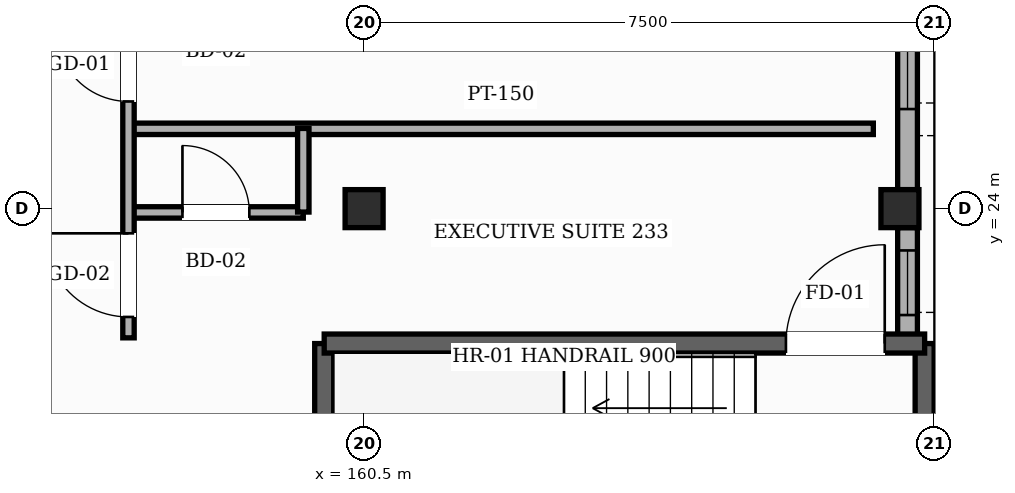
"""IFC4 building model, lengths in metres.
Left out: names, types, materials, properties, quantities, classifications, styles, units other than length and angle.
Written with IfcOpenShell. Run it as: python <this file> out.ifc"""

import sys

from ifc_helpers import new_model, si_unit, direction, frame, frame_2d, origin, origin_2d, place, context, subcontext, project, spatial, rectangle, hollow_rectangle, extrude, element, fill, save


model = new_model("IFC4")
c1 = context("Model", 3, precision=1e-05, world=origin(), true_north=direction((0.0, 1.0)))
c2 = subcontext(c1, "Body", "Model", "MODEL_VIEW")
j1 = project(units=[si_unit("LENGTHUNIT", "METRE"), si_unit("PLANEANGLEUNIT", "RADIAN")], contexts=[c1])
p1 = place(None, origin())
s1 = spatial("IfcSite", under=j1, at=p1, CompositionType="ELEMENT")
p2 = place(p1, origin())
s2 = spatial("IfcBuilding", under=s1, at=p2, CompositionType="ELEMENT")
p3 = place(p2, frame((0.0, 0.0, 35.4)))
s3 = spatial("IfcBuildingStorey", under=s2, at=p3, CompositionType="ELEMENT", Elevation=35.4)
for number, where, z_axis, x_axis in (
    (1, (160.5, 24.0, 0.0), (0.0, 0.0, 1.0), (1.0, 0.0, 0.0)),
    (2, (167.55, 24.0, 0.0), (0.0, 0.0, 1.0), (1.0, 0.0, 0.0)),
):
    element("IfcColumn", number, at=place(p3, frame(where, z_axis=z_axis, x_axis=x_axis)), inside=s3, PredefinedType="COLUMN", context=c2, shape_type="SweptSolid", body=[
        extrude(hollow_rectangle(XDim=0.5, YDim=0.5, WallThickness=0.022, InnerFilletRadius=0.022, OuterFilletRadius=0.044, at=origin_2d()), origin(), (0.0, 0.0, 1.0), 3.6),
    ])
p4 = place(p3, frame((167.65, 23.75, 0.0), z_axis=(0.0, 0.0, 1.0), x_axis=(0.0, -1.0, 0.0)))
e3 = element("IfcWall", 3, at=p4, inside=s3, PredefinedType="SOLIDWALL", context=c2, shape_type="SweptSolid", body=[
    extrude(rectangle(XDim=1.525, YDim=0.26, at=frame_2d((0.762, 0.0))), origin(), (0.0, 0.0, 1.0), 3.365),
])
p5 = place(p4, frame((0.3, 0.0, 0.85)))
e4 = element("IfcOpeningElement", 4, at=p5, cuts=e3, PredefinedType="OPENING", context=c2, shape_type="SweptSolid", body=[
    extrude(rectangle(XDim=0.85, YDim=1.35, at=frame_2d((0.425, 0.675))), frame((0.0, 0.14, 0.0), z_axis=(0.0, -1.0, 0.0), x_axis=(1.0, 0.0, 0.0)), (0.0, 0.0, 1.0), 0.28),
])
p6 = place(p3, frame((167.65, 31.75, 0.0), z_axis=(0.0, 0.0, 1.0), x_axis=(0.0, -1.0, 0.0)))
e5 = element("IfcWall", 5, at=p6, inside=s3, PredefinedType="SOLIDWALL", context=c2, shape_type="SweptSolid", body=[
    extrude(rectangle(XDim=7.5, YDim=0.26, at=frame_2d((3.75, 0.0))), origin(), (0.0, 0.0, 1.0), 2.755),
])
p7 = place(p6, frame((4.19, 0.0, 0.85)))
e6 = element("IfcOpeningElement", 6, at=p7, cuts=e5, PredefinedType="OPENING", context=c2, shape_type="SweptSolid", body=[
    extrude(rectangle(XDim=2.25, YDim=1.65, at=frame_2d((1.125, 0.825))), frame((0.0, 0.14, 0.0), z_axis=(0.0, -1.0, 0.0), x_axis=(1.0, 0.0, 0.0)), (0.0, 0.0, 1.0), 0.28),
])
p8 = place(p6, frame((1.88, 0.0, 0.85)))
e7 = element("IfcOpeningElement", 7, at=p8, cuts=e5, PredefinedType="OPENING", context=c2, shape_type="SweptSolid", body=[
    extrude(rectangle(XDim=1.35, YDim=1.35, at=frame_2d((0.675, 0.675))), frame((0.0, 0.14, 0.0), z_axis=(0.0, -1.0, 0.0), x_axis=(1.0, 0.0, 0.0)), (0.0, 0.0, 1.0), 0.28),
])
p9 = place(p6, frame((0.165, 0.0, 0.85)))
e8 = element("IfcOpeningElement", 8, at=p9, cuts=e5, PredefinedType="OPENING", context=c2, shape_type="SweptSolid", body=[
    extrude(rectangle(XDim=0.85, YDim=1.35, at=frame_2d((0.425, 0.675))), frame((0.0, 0.14, 0.0), z_axis=(0.0, -1.0, 0.0), x_axis=(1.0, 0.0, 0.0)), (0.0, 0.0, 1.0), 0.28),
])
for number, where, z_axis, x_axis in (
    (9, (167.875, 22.225, 0.0), (0.0, 0.0, 1.0), (0.0, -1.0, 0.0)),
    (10, (159.975, 18.875, 0.0), (0.0, 0.0, 1.0), (0.0, 1.0, 0.0)),
):
    element("IfcWall", number, at=place(p3, frame(where, z_axis=z_axis, x_axis=x_axis)), inside=s3, PredefinedType="SHEAR", context=c2, shape_type="SweptSolid", body=[
        extrude(rectangle(XDim=3.35, YDim=0.25, at=frame_2d((1.675, 0.0))), origin(), (0.0, 0.0, 1.0), 3.38),
    ])
p10 = place(p3, frame((159.975, 22.225, 0.0), z_axis=(0.0, 0.0, 1.0), x_axis=(1.0, 0.0, 0.0)))
e11 = element("IfcWall", 11, at=p10, inside=s3, PredefinedType="SHEAR", context=c2, shape_type="SweptSolid", body=[
    extrude(rectangle(XDim=7.9, YDim=0.25, at=frame_2d((3.95, 0.0))), origin(), (0.0, 0.0, 1.0), 3.38),
])
p11 = place(p10, frame((6.075, 0.0, 0.0)))
e12 = element("IfcOpeningElement", 12, at=p11, cuts=e11, PredefinedType="OPENING", context=c2, shape_type="SweptSolid", body=[
    extrude(rectangle(XDim=1.3, YDim=2.2, at=frame_2d((0.65, 1.1))), frame((0.0, 0.135, 0.0), z_axis=(0.0, -1.0, 0.0), x_axis=(1.0, 0.0, 0.0)), (0.0, 0.0, 1.0), 0.27),
])
p12 = place(p3, frame((157.4, 23.95, 0.0), z_axis=(0.0, 0.0, 1.0), x_axis=(1.0, 0.0, 0.0)))
e13 = element("IfcWall", 13, at=p12, inside=s3, PredefinedType="PARTITIONING", context=c2, shape_type="SweptSolid", body=[
    extrude(rectangle(XDim=2.3, YDim=0.15, at=frame_2d((1.15, 0.0))), origin(), (0.0, 0.0, 1.0), 2.755),
])
p13 = place(p12, frame((0.71, 0.0, 0.0)))
e14 = element("IfcOpeningElement", 14, at=p13, cuts=e13, PredefinedType="OPENING", context=c2, shape_type="SweptSolid", body=[
    extrude(rectangle(XDim=0.88, YDim=2.12, at=frame_2d((0.44, 1.06))), frame((0.0, 0.085, 0.0), z_axis=(0.0, -1.0, 0.0), x_axis=(1.0, 0.0, 0.0)), (0.0, 0.0, 1.0), 0.17),
])
p14 = place(p3, frame((157.4, 25.05, 0.0), z_axis=(0.0, 0.0, 1.0), x_axis=(1.0, 0.0, 0.0)))
e15 = element("IfcWall", 15, at=p14, inside=s3, PredefinedType="PARTITIONING", context=c2, shape_type="SweptSolid", body=[
    extrude(rectangle(XDim=9.8, YDim=0.15, at=frame_2d((4.9, 0.0))), origin(), (0.0, 0.0, 1.0), 3.365),
])
p15 = place(p3, frame((157.4, 22.3, 0.0), z_axis=(0.0, 0.0, 1.0), x_axis=(0.0, 1.0, 0.0)))
e16 = element("IfcWall", 16, at=p15, inside=s3, PredefinedType="PARTITIONING", context=c2, shape_type="SweptSolid", body=[
    extrude(rectangle(XDim=48.5, YDim=0.15, at=frame_2d((24.25, 0.0))), origin(), (0.0, 0.0, 1.0), 3.365),
])
p16 = place(p15, frame((24.875, 0.0, 0.0)))
e17 = element("IfcOpeningElement", 17, at=p16, cuts=e16, PredefinedType="OPENING", context=c2, shape_type="SweptSolid", body=[
    extrude(rectangle(XDim=1.65, YDim=2.35, at=frame_2d((0.825, 1.175))), frame((0.0, 0.085, 0.0), z_axis=(0.0, -1.0, 0.0), x_axis=(1.0, 0.0, 0.0)), (0.0, 0.0, 1.0), 0.17),
])
p17 = place(p15, frame((0.275, 0.0, 0.0)))
e18 = element("IfcOpeningElement", 18, at=p17, cuts=e16, PredefinedType="OPENING", context=c2, shape_type="SweptSolid", body=[
    extrude(rectangle(XDim=1.1, YDim=2.2, at=frame_2d((0.55, 1.1))), frame((0.0, 0.085, 0.0), z_axis=(0.0, -1.0, 0.0), x_axis=(1.0, 0.0, 0.0)), (0.0, 0.0, 1.0), 0.17),
])
p18 = place(p15, frame((3.11, 0.0, 0.0)))
e19 = element("IfcOpeningElement", 19, at=p18, cuts=e16, PredefinedType="OPENING", context=c2, shape_type="SweptSolid", body=[
    extrude(rectangle(XDim=0.95, YDim=2.15, at=frame_2d((0.475, 1.075))), frame((0.0, 0.085, 0.0), z_axis=(0.0, -1.0, 0.0), x_axis=(1.0, 0.0, 0.0)), (0.0, 0.0, 1.0), 0.17),
])
p19 = place(p15, frame((5.865, 0.0, 0.0)))
e20 = element("IfcOpeningElement", 20, at=p19, cuts=e16, PredefinedType="OPENING", context=c2, shape_type="SweptSolid", body=[
    extrude(rectangle(XDim=0.95, YDim=2.15, at=frame_2d((0.475, 1.075))), frame((0.0, 0.085, 0.0), z_axis=(0.0, -1.0, 0.0), x_axis=(1.0, 0.0, 0.0)), (0.0, 0.0, 1.0), 0.17),
])
p20 = place(p15, frame((8.625, 0.0, 0.0)))
e21 = element("IfcOpeningElement", 21, at=p20, cuts=e16, PredefinedType="OPENING", context=c2, shape_type="SweptSolid", body=[
    extrude(rectangle(XDim=0.95, YDim=2.15, at=frame_2d((0.475, 1.075))), frame((0.0, 0.085, 0.0), z_axis=(0.0, -1.0, 0.0), x_axis=(1.0, 0.0, 0.0)), (0.0, 0.0, 1.0), 0.17),
])
p21 = place(p15, frame((11.38, 0.0, 0.0)))
e22 = element("IfcOpeningElement", 22, at=p21, cuts=e16, PredefinedType="OPENING", context=c2, shape_type="SweptSolid", body=[
    extrude(rectangle(XDim=0.95, YDim=2.15, at=frame_2d((0.475, 1.075))), frame((0.0, 0.085, 0.0), z_axis=(0.0, -1.0, 0.0), x_axis=(1.0, 0.0, 0.0)), (0.0, 0.0, 1.0), 0.17),
])
p22 = place(p15, frame((14.14, 0.0, 0.0)))
e23 = element("IfcOpeningElement", 23, at=p22, cuts=e16, PredefinedType="OPENING", context=c2, shape_type="SweptSolid", body=[
    extrude(rectangle(XDim=0.95, YDim=2.15, at=frame_2d((0.475, 1.075))), frame((0.0, 0.085, 0.0), z_axis=(0.0, -1.0, 0.0), x_axis=(1.0, 0.0, 0.0)), (0.0, 0.0, 1.0), 0.17),
])
p23 = place(p15, frame((16.895, 0.0, 0.0)))
e24 = element("IfcOpeningElement", 24, at=p23, cuts=e16, PredefinedType="OPENING", context=c2, shape_type="SweptSolid", body=[
    extrude(rectangle(XDim=0.95, YDim=2.15, at=frame_2d((0.475, 1.075))), frame((0.0, 0.085, 0.0), z_axis=(0.0, -1.0, 0.0), x_axis=(1.0, 0.0, 0.0)), (0.0, 0.0, 1.0), 0.17),
])
p24 = place(p15, frame((32.37, 0.0, 0.0)))
e25 = element("IfcOpeningElement", 25, at=p24, cuts=e16, PredefinedType="OPENING", context=c2, shape_type="SweptSolid", body=[
    extrude(rectangle(XDim=1.1, YDim=2.2, at=frame_2d((0.55, 1.1))), frame((0.0, 0.085, 0.0), z_axis=(0.0, -1.0, 0.0), x_axis=(1.0, 0.0, 0.0)), (0.0, 0.0, 1.0), 0.17),
])
p25 = place(p15, frame((35.175, 0.0, 0.0)))
e26 = element("IfcOpeningElement", 26, at=p25, cuts=e16, PredefinedType="OPENING", context=c2, shape_type="SweptSolid", body=[
    extrude(rectangle(XDim=0.95, YDim=2.15, at=frame_2d((0.475, 1.075))), frame((0.0, 0.085, 0.0), z_axis=(0.0, -1.0, 0.0), x_axis=(1.0, 0.0, 0.0)), (0.0, 0.0, 1.0), 0.17),
])
p26 = place(p15, frame((37.91, 0.0, 0.0)))
e27 = element("IfcOpeningElement", 27, at=p26, cuts=e16, PredefinedType="OPENING", context=c2, shape_type="SweptSolid", body=[
    extrude(rectangle(XDim=0.95, YDim=2.15, at=frame_2d((0.475, 1.075))), frame((0.0, 0.085, 0.0), z_axis=(0.0, -1.0, 0.0), x_axis=(1.0, 0.0, 0.0)), (0.0, 0.0, 1.0), 0.17),
])
p27 = place(p15, frame((40.64, 0.0, 0.0)))
e28 = element("IfcOpeningElement", 28, at=p27, cuts=e16, PredefinedType="OPENING", context=c2, shape_type="SweptSolid", body=[
    extrude(rectangle(XDim=0.95, YDim=2.15, at=frame_2d((0.475, 1.075))), frame((0.0, 0.085, 0.0), z_axis=(0.0, -1.0, 0.0), x_axis=(1.0, 0.0, 0.0)), (0.0, 0.0, 1.0), 0.17),
])
p28 = place(p15, frame((43.375, 0.0, 0.0)))
e29 = element("IfcOpeningElement", 29, at=p28, cuts=e16, PredefinedType="OPENING", context=c2, shape_type="SweptSolid", body=[
    extrude(rectangle(XDim=0.95, YDim=2.15, at=frame_2d((0.475, 1.075))), frame((0.0, 0.085, 0.0), z_axis=(0.0, -1.0, 0.0), x_axis=(1.0, 0.0, 0.0)), (0.0, 0.0, 1.0), 0.17),
])
p29 = place(p15, frame((46.11, 0.0, 0.0)))
e30 = element("IfcOpeningElement", 30, at=p29, cuts=e16, PredefinedType="OPENING", context=c2, shape_type="SweptSolid", body=[
    extrude(rectangle(XDim=0.95, YDim=2.15, at=frame_2d((0.475, 1.075))), frame((0.0, 0.085, 0.0), z_axis=(0.0, -1.0, 0.0), x_axis=(1.0, 0.0, 0.0)), (0.0, 0.0, 1.0), 0.17),
])
p30 = place(p3, frame((159.7, 23.955, 0.0), z_axis=(0.0, 0.0, 1.0), x_axis=(0.0, 1.0, 0.0)))
e31 = element("IfcWall", 31, at=p30, inside=s3, PredefinedType="PARTITIONING", context=c2, shape_type="SweptSolid", body=[
    extrude(rectangle(XDim=1.1, YDim=0.15, at=frame_2d((0.55, 0.0))), origin(), (0.0, 0.0, 1.0), 3.365),
])
p31 = place(p5, origin())
e32 = element("IfcWindow", 32, at=p31, inside=s3, PartitioningType="SINGLE_PANEL", PredefinedType="WINDOW", context=c2, shape_type="SweptSolid", body=[
    extrude(rectangle(XDim=0.85, YDim=1.35, at=frame_2d((0.425, 0.675))), frame((0.0, 0.03, 0.0), z_axis=(0.0, -1.0, 0.0), x_axis=(1.0, 0.0, 0.0)), (0.0, 0.0, 1.0), 0.06),
])
fill(e4, e32)
p32 = place(p7, origin())
e33 = element("IfcWindow", 33, at=p32, inside=s3, PartitioningType="SINGLE_PANEL", PredefinedType="WINDOW", context=c2, shape_type="SweptSolid", body=[
    extrude(rectangle(XDim=2.25, YDim=1.65, at=frame_2d((1.125, 0.825))), frame((0.0, 0.03, 0.0), z_axis=(0.0, -1.0, 0.0), x_axis=(1.0, 0.0, 0.0)), (0.0, 0.0, 1.0), 0.06),
])
fill(e6, e33)
p33 = place(p11, origin())
e34 = element("IfcDoor", 34, at=p33, inside=s3, OperationType="SINGLE_SWING_RIGHT", PredefinedType="DOOR", context=c2, shape_type="SweptSolid", body=[
    extrude(rectangle(XDim=1.3, YDim=2.2, at=frame_2d((0.65, 1.1))), frame((0.0, 0.025, 0.0), z_axis=(0.0, -1.0, 0.0), x_axis=(1.0, 0.0, 0.0)), (0.0, 0.0, 1.0), 0.05),
])
fill(e12, e34)
p34 = place(p17, origin())
e35 = element("IfcDoor", 35, at=p34, inside=s3, OperationType="SINGLE_SWING_RIGHT", PredefinedType="DOOR", context=c2, shape_type="SweptSolid", body=[
    extrude(rectangle(XDim=1.1, YDim=2.2, at=frame_2d((0.55, 1.1))), frame((0.0, 0.025, 0.0), z_axis=(0.0, -1.0, 0.0), x_axis=(1.0, 0.0, 0.0)), (0.0, 0.0, 1.0), 0.05),
])
fill(e18, e35)
p35 = place(p13, origin())
e36 = element("IfcDoor", 36, at=p35, inside=s3, OperationType="SINGLE_SWING_LEFT", PredefinedType="DOOR", context=c2, shape_type="SweptSolid", body=[
    extrude(rectangle(XDim=0.88, YDim=2.12, at=frame_2d((0.44, 1.06))), frame((0.0, 0.025, 0.0), z_axis=(0.0, -1.0, 0.0), x_axis=(1.0, 0.0, 0.0)), (0.0, 0.0, 1.0), 0.05),
])
fill(e14, e36)
p36 = place(p18, origin())
e37 = element("IfcDoor", 37, at=p36, inside=s3, OperationType="SINGLE_SWING_RIGHT", PredefinedType="DOOR", context=c2, shape_type="SweptSolid", body=[
    extrude(rectangle(XDim=0.95, YDim=2.15, at=frame_2d((0.475, 1.075))), frame((0.0, 0.025, 0.0), z_axis=(0.0, -1.0, 0.0), x_axis=(1.0, 0.0, 0.0)), (0.0, 0.0, 1.0), 0.05),
])
fill(e19, e37)
save(model, sys.argv[1])
